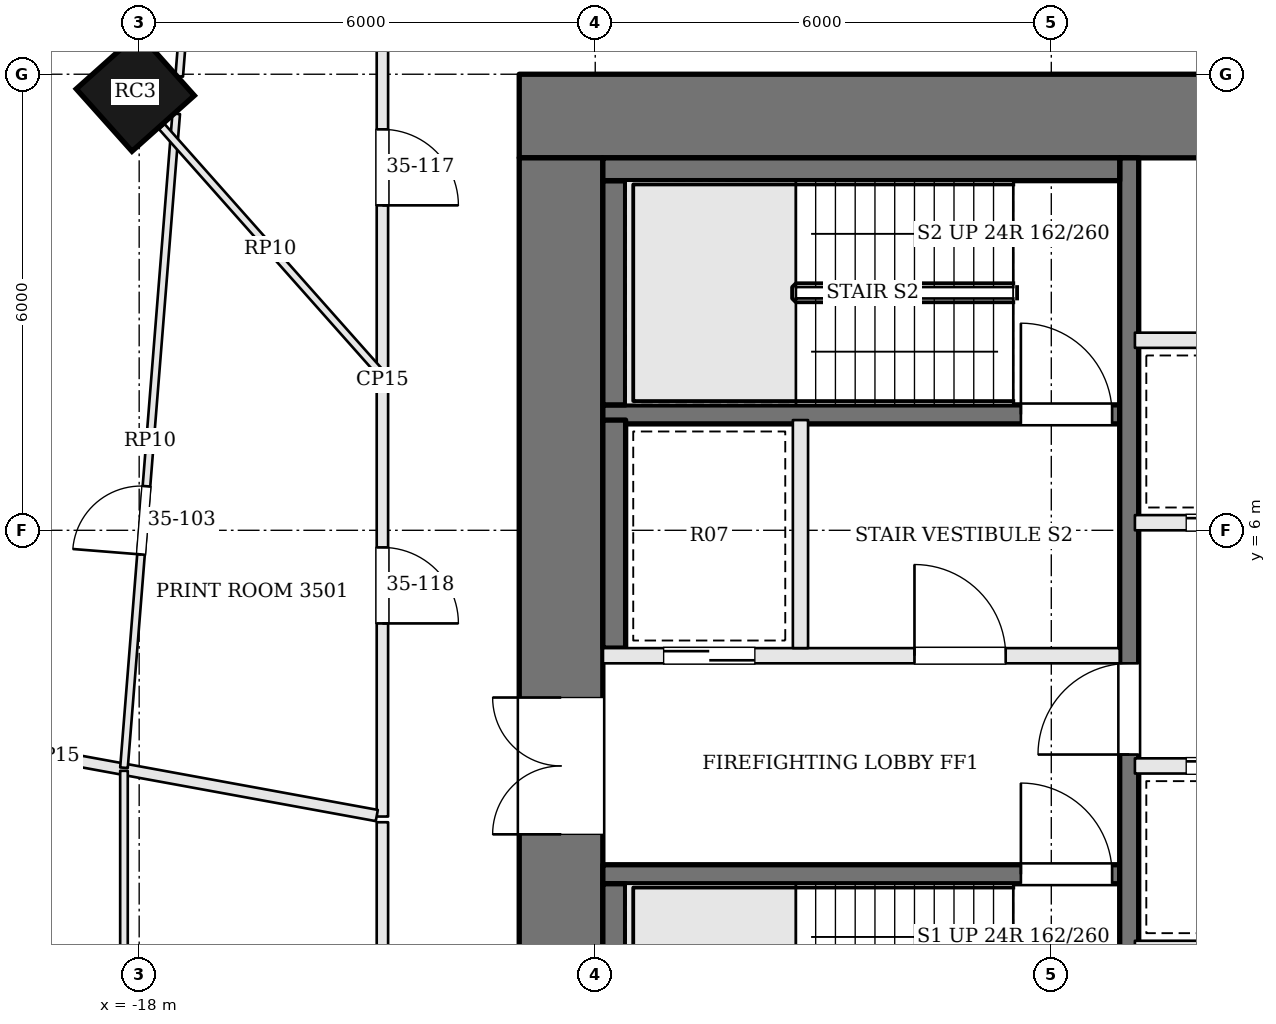
"""IFC4 building model, lengths in metres.
Left out: names, types, materials, properties, quantities, classifications, styles, units other than length and angle.
Written with IfcOpenShell. Run it as: python <this file> out.ifc"""

import sys

from ifc_helpers import new_model, si_unit, direction, frame, frame_2d, origin, origin_2d, place, context, subcontext, project, spatial, rectangle, extrude, element, fill, save


model = new_model("IFC4")
c1 = context("Model", 3, precision=1e-05, world=origin(), true_north=direction((0.0, 1.0)))
c2 = subcontext(c1, "Body", "Model", "MODEL_VIEW")
j1 = project(units=[si_unit("LENGTHUNIT", "METRE"), si_unit("PLANEANGLEUNIT", "RADIAN")], contexts=[c1])
p1 = place(None, origin())
s1 = spatial("IfcSite", under=j1, at=p1, CompositionType="ELEMENT")
p2 = place(p1, origin())
s2 = spatial("IfcBuilding", under=s1, at=p2, CompositionType="ELEMENT")
p3 = place(p2, frame((0.0, 0.0, 146.1)))
s3 = spatial("IfcBuildingStorey", under=s2, at=p3, CompositionType="ELEMENT", Elevation=146.1)
p4 = place(p3, frame((-13.0, 11.45, 0.0), z_axis=(0.0, 0.0, 1.0), x_axis=(1.0, 0.0, 0.0)))
e1 = element("IfcWall", 1, at=p4, inside=s3, PredefinedType="SHEAR", context=c2, shape_type="SweptSolid", body=[
    extrude(rectangle(XDim=26.0, YDim=1.1, at=frame_2d((13.0, 0.0))), origin(), (0.0, 0.0, 1.0), 3.9),
])
p5 = place(p4, frame((8.975, 0.0, 0.0)))
e2 = element("IfcOpeningElement", 2, at=p5, cuts=e1, PredefinedType="OPENING", context=c2, shape_type="SweptSolid", body=[
    extrude(rectangle(XDim=0.7, YDim=2.1, at=frame_2d((0.35, 1.05))), frame((0.0, 0.56, 0.0), z_axis=(0.0, -1.0, 0.0), x_axis=(1.0, 0.0, 0.0)), (0.0, 0.0, 1.0), 1.12),
])
p6 = place(p4, frame((11.025, 0.0, 0.0)))
e3 = element("IfcOpeningElement", 3, at=p6, cuts=e1, PredefinedType="OPENING", context=c2, shape_type="SweptSolid", body=[
    extrude(rectangle(XDim=0.7, YDim=2.1, at=frame_2d((0.35, 1.05))), frame((0.0, 0.56, 0.0), z_axis=(0.0, -1.0, 0.0), x_axis=(1.0, 0.0, 0.0)), (0.0, 0.0, 1.0), 1.12),
])
p7 = place(p4, frame((12.925, 0.0, 0.0)))
e4 = element("IfcOpeningElement", 4, at=p7, cuts=e1, PredefinedType="OPENING", context=c2, shape_type="SweptSolid", body=[
    extrude(rectangle(XDim=1.0, YDim=2.1, at=frame_2d((0.5, 1.05))), frame((0.0, 0.56, 0.0), z_axis=(0.0, -1.0, 0.0), x_axis=(1.0, 0.0, 0.0)), (0.0, 0.0, 1.0), 1.12),
])
p8 = place(p4, frame((15.775, 0.0, 0.0)))
e5 = element("IfcOpeningElement", 5, at=p8, cuts=e1, PredefinedType="OPENING", context=c2, shape_type="SweptSolid", body=[
    extrude(rectangle(XDim=1.0, YDim=2.1, at=frame_2d((0.5, 1.05))), frame((0.0, 0.56, 0.0), z_axis=(0.0, -1.0, 0.0), x_axis=(1.0, 0.0, 0.0)), (0.0, 0.0, 1.0), 1.12),
])
p9 = place(p3, frame((-12.45, -1.9, 0.0), z_axis=(0.0, 0.0, 1.0), x_axis=(0.0, 1.0, 0.0)))
e6 = element("IfcWall", 6, at=p9, inside=s3, PredefinedType="SHEAR", context=c2, shape_type="SweptSolid", body=[
    extrude(rectangle(XDim=12.8, YDim=1.1, at=frame_2d((6.4, 0.0))), origin(), (0.0, 0.0, 1.0), 3.9),
])
p10 = place(p9, frame((3.9, 0.0, 0.0)))
e7 = element("IfcOpeningElement", 7, at=p10, cuts=e6, PredefinedType="OPENING", context=c2, shape_type="SweptSolid", body=[
    extrude(rectangle(XDim=1.8, YDim=2.1, at=frame_2d((0.9, 1.05))), frame((0.0, 0.56, 0.0), z_axis=(0.0, -1.0, 0.0), x_axis=(1.0, 0.0, 0.0)), (0.0, 0.0, 1.0), 1.12),
])
p11 = place(p3, frame((-18.051, 11.763, 0.0), z_axis=(0.0, 0.0, 1.0), x_axis=(-0.7456420961, -0.66634665492, 0.0)))
e8 = element("IfcColumn", 8, at=p11, inside=s3, PredefinedType="COLUMN", context=c2, shape_type="SweptSolid", body=[
    extrude(rectangle(XDim=1.1, YDim=1.1, at=origin_2d()), origin(), (0.0, 0.0, 1.0), 3.9),
])
p12 = place(p3, frame((-11.9, 1.475, 0.0), z_axis=(0.0, 0.0, 1.0), x_axis=(1.0, 0.0, 0.0)))
e9 = element("IfcWall", 9, at=p12, inside=s3, PredefinedType="SOLIDWALL", context=c2, shape_type="SweptSolid", body=[
    extrude(rectangle(XDim=6.8, YDim=0.25, at=frame_2d((3.4, 0.0))), origin(), (0.0, 0.0, 1.0), 3.7),
])
p13 = place(p12, frame((5.5, 0.0, 0.0)))
e10 = element("IfcOpeningElement", 10, at=p13, cuts=e9, PredefinedType="OPENING", context=c2, shape_type="SweptSolid", body=[
    extrude(rectangle(XDim=1.2, YDim=2.1, at=frame_2d((0.6, 1.05))), frame((0.0, 0.135, 0.0), z_axis=(0.0, -1.0, 0.0), x_axis=(1.0, 0.0, 0.0)), (0.0, 0.0, 1.0), 0.27),
])
p14 = place(p3, frame((-11.9, 4.35, 0.0), z_axis=(0.0, 0.0, 1.0), x_axis=(1.0, 0.0, 0.0)))
e11 = element("IfcWall", 11, at=p14, inside=s3, PredefinedType="SOLIDWALL", context=c2, shape_type="SweptSolid", body=[
    extrude(rectangle(XDim=6.8, YDim=0.2, at=frame_2d((3.4, 0.0))), origin(), (0.0, 0.0, 1.0), 3.7),
])
p15 = place(p14, frame((4.1, 0.0, 0.0)))
e12 = element("IfcOpeningElement", 12, at=p15, cuts=e11, PredefinedType="OPENING", context=c2, shape_type="SweptSolid", body=[
    extrude(rectangle(XDim=1.2, YDim=2.1, at=frame_2d((0.6, 1.05))), frame((0.0, 0.11, 0.0), z_axis=(0.0, -1.0, 0.0), x_axis=(1.0, 0.0, 0.0)), (0.0, 0.0, 1.0), 0.22),
])
p16 = place(p14, frame((0.8, 0.0, 0.0)))
e13 = element("IfcOpeningElement", 13, at=p16, cuts=e11, PredefinedType="OPENING", context=c2, shape_type="SweptSolid", body=[
    extrude(rectangle(XDim=1.2, YDim=2.1, at=frame_2d((0.6, 1.05))), frame((0.0, 0.11, 0.0), z_axis=(0.0, -1.0, 0.0), x_axis=(1.0, 0.0, 0.0)), (0.0, 0.0, 1.0), 0.22),
])
p17 = place(p3, frame((-11.9, 7.525, 0.0), z_axis=(0.0, 0.0, 1.0), x_axis=(1.0, 0.0, 0.0)))
e14 = element("IfcWall", 14, at=p17, inside=s3, PredefinedType="SOLIDWALL", context=c2, shape_type="SweptSolid", body=[
    extrude(rectangle(XDim=6.8, YDim=0.25, at=frame_2d((3.4, 0.0))), origin(), (0.0, 0.0, 1.0), 3.7),
])
p18 = place(p17, frame((5.5, 0.0, 0.0)))
e15 = element("IfcOpeningElement", 15, at=p18, cuts=e14, PredefinedType="OPENING", context=c2, shape_type="SweptSolid", body=[
    extrude(rectangle(XDim=1.2, YDim=2.1, at=frame_2d((0.6, 1.05))), frame((0.0, 0.135, 0.0), z_axis=(0.0, -1.0, 0.0), x_axis=(1.0, 0.0, 0.0)), (0.0, 0.0, 1.0), 0.27),
])
p19 = place(p3, frame((-9.3, 4.45, 0.0), z_axis=(0.0, 0.0, 1.0), x_axis=(0.0, 1.0, 0.0)))
e16 = element("IfcWall", 16, at=p19, inside=s3, PredefinedType="SOLIDWALL", context=c2, shape_type="SweptSolid", body=[
    extrude(rectangle(XDim=3.0, YDim=0.2, at=frame_2d((1.5, 0.0))), origin(), (0.0, 0.0, 1.0), 3.7),
])
p20 = place(p3, frame((-4.975, -1.9, 0.0), z_axis=(0.0, 0.0, 1.0), x_axis=(0.0, 1.0, 0.0)))
e17 = element("IfcWall", 17, at=p20, inside=s3, PredefinedType="SOLIDWALL", context=c2, shape_type="SweptSolid", body=[
    extrude(rectangle(XDim=12.8, YDim=0.25, at=frame_2d((6.4, 0.0))), origin(), (0.0, 0.0, 1.0), 3.7),
])
p21 = place(p20, frame((4.95, 0.0, 0.0)))
e18 = element("IfcOpeningElement", 18, at=p21, cuts=e17, PredefinedType="OPENING", context=c2, shape_type="SweptSolid", body=[
    extrude(rectangle(XDim=1.2, YDim=2.1, at=frame_2d((0.6, 1.05))), frame((0.0, 0.135, 0.0), z_axis=(0.0, -1.0, 0.0), x_axis=(1.0, 0.0, 0.0)), (0.0, 0.0, 1.0), 0.27),
])
p22 = place(p3, frame((-11.75, -1.6, 0.0), z_axis=(0.0, 0.0, 1.0), x_axis=(0.0, 1.0, 0.0)))
e19 = element("IfcWall", 19, at=p22, inside=s3, PredefinedType="SOLIDWALL", context=c2, shape_type="SweptSolid", body=[
    extrude(rectangle(XDim=2.95, YDim=0.3, at=frame_2d((1.475, 0.0))), origin(), (0.0, 0.0, 1.0), 3.7),
])
p23 = place(p3, frame((-11.75, 4.45, 0.0), z_axis=(0.0, 0.0, 1.0), x_axis=(0.0, 1.0, 0.0)))
e20 = element("IfcWall", 20, at=p23, inside=s3, PredefinedType="SOLIDWALL", context=c2, shape_type="SweptSolid", body=[
    extrude(rectangle(XDim=3.0, YDim=0.3, at=frame_2d((1.5, 0.0))), origin(), (0.0, 0.0, 1.0), 3.7),
])
p24 = place(p3, frame((-11.75, 7.65, 0.0), z_axis=(0.0, 0.0, 1.0), x_axis=(0.0, 1.0, 0.0)))
e21 = element("IfcWall", 21, at=p24, inside=s3, PredefinedType="SOLIDWALL", context=c2, shape_type="SweptSolid", body=[
    extrude(rectangle(XDim=2.95, YDim=0.3, at=frame_2d((1.475, 0.0))), origin(), (0.0, 0.0, 1.0), 3.7),
])
p25 = place(p3, frame((-11.9, 10.75, 0.0), z_axis=(0.0, 0.0, 1.0), x_axis=(1.0, 0.0, 0.0)))
e22 = element("IfcWall", 22, at=p25, inside=s3, PredefinedType="SOLIDWALL", context=c2, shape_type="SweptSolid", body=[
    extrude(rectangle(XDim=6.8, YDim=0.3, at=frame_2d((3.4, 0.0))), origin(), (0.0, 0.0, 1.0), 3.7),
])
p26 = place(p3, frame((-4.9, 0.5, 0.0), z_axis=(0.0, 0.0, 1.0), x_axis=(1.0, 0.0, 0.0)))
e23 = element("IfcWall", 23, at=p26, inside=s3, PredefinedType="SOLIDWALL", context=c2, shape_type="SweptSolid", body=[
    extrude(rectangle(XDim=9.8, YDim=0.2, at=frame_2d((4.9, 0.0))), origin(), (0.0, 0.0, 1.0), 3.7),
])
p27 = place(p3, frame((-4.9, 2.9, 0.0), z_axis=(0.0, 0.0, 1.0), x_axis=(1.0, 0.0, 0.0)))
e24 = element("IfcWall", 24, at=p27, inside=s3, PredefinedType="SOLIDWALL", context=c2, shape_type="SweptSolid", body=[
    extrude(rectangle(XDim=9.8, YDim=0.2, at=frame_2d((4.9, 0.0))), origin(), (0.0, 0.0, 1.0), 3.7),
])
p28 = place(p27, frame((0.675, 0.0, 0.0)))
e25 = element("IfcOpeningElement", 25, at=p28, cuts=e24, PredefinedType="OPENING", context=c2, shape_type="SweptSolid", body=[
    extrude(rectangle(XDim=1.1, YDim=2.1, at=frame_2d((0.55, 1.05))), frame((0.0, 0.11, 0.0), z_axis=(0.0, -1.0, 0.0), x_axis=(1.0, 0.0, 0.0)), (0.0, 0.0, 1.0), 0.22),
])
p29 = place(p27, frame((2.613, 0.0, 0.0)))
e26 = element("IfcOpeningElement", 26, at=p29, cuts=e24, PredefinedType="OPENING", context=c2, shape_type="SweptSolid", body=[
    extrude(rectangle(XDim=0.9, YDim=2.1, at=frame_2d((0.45, 1.05))), frame((0.0, 0.11, 0.0), z_axis=(0.0, -1.0, 0.0), x_axis=(1.0, 0.0, 0.0)), (0.0, 0.0, 1.0), 0.22),
])
p30 = place(p27, frame((4.35, 0.0, 0.0)))
e27 = element("IfcOpeningElement", 27, at=p30, cuts=e24, PredefinedType="OPENING", context=c2, shape_type="SweptSolid", body=[
    extrude(rectangle(XDim=1.1, YDim=2.1, at=frame_2d((0.55, 1.05))), frame((0.0, 0.11, 0.0), z_axis=(0.0, -1.0, 0.0), x_axis=(1.0, 0.0, 0.0)), (0.0, 0.0, 1.0), 0.22),
])
p31 = place(p27, frame((7.463, 0.0, 0.0)))
e28 = element("IfcOpeningElement", 28, at=p31, cuts=e24, PredefinedType="OPENING", context=c2, shape_type="SweptSolid", body=[
    extrude(rectangle(XDim=1.0, YDim=2.1, at=frame_2d((0.5, 1.05))), frame((0.0, 0.11, 0.0), z_axis=(0.0, -1.0, 0.0), x_axis=(1.0, 0.0, 0.0)), (0.0, 0.0, 1.0), 0.22),
])
p32 = place(p3, frame((-4.9, 6.1, 0.0), z_axis=(0.0, 0.0, 1.0), x_axis=(1.0, 0.0, 0.0)))
e29 = element("IfcWall", 29, at=p32, inside=s3, PredefinedType="SOLIDWALL", context=c2, shape_type="SweptSolid", body=[
    extrude(rectangle(XDim=9.8, YDim=0.2, at=frame_2d((4.9, 0.0))), origin(), (0.0, 0.0, 1.0), 3.7),
])
p33 = place(p32, frame((0.675, 0.0, 0.0)))
e30 = element("IfcOpeningElement", 30, at=p33, cuts=e29, PredefinedType="OPENING", context=c2, shape_type="SweptSolid", body=[
    extrude(rectangle(XDim=1.1, YDim=2.1, at=frame_2d((0.55, 1.05))), frame((0.0, 0.11, 0.0), z_axis=(0.0, -1.0, 0.0), x_axis=(1.0, 0.0, 0.0)), (0.0, 0.0, 1.0), 0.22),
])
p34 = place(p32, frame((3.125, 0.0, 0.0)))
e31 = element("IfcOpeningElement", 31, at=p34, cuts=e29, PredefinedType="OPENING", context=c2, shape_type="SweptSolid", body=[
    extrude(rectangle(XDim=1.1, YDim=2.1, at=frame_2d((0.55, 1.05))), frame((0.0, 0.11, 0.0), z_axis=(0.0, -1.0, 0.0), x_axis=(1.0, 0.0, 0.0)), (0.0, 0.0, 1.0), 0.22),
])
p35 = place(p32, frame((5.575, 0.0, 0.0)))
e32 = element("IfcOpeningElement", 32, at=p35, cuts=e29, PredefinedType="OPENING", context=c2, shape_type="SweptSolid", body=[
    extrude(rectangle(XDim=1.1, YDim=2.1, at=frame_2d((0.55, 1.05))), frame((0.0, 0.11, 0.0), z_axis=(0.0, -1.0, 0.0), x_axis=(1.0, 0.0, 0.0)), (0.0, 0.0, 1.0), 0.22),
])
p36 = place(p32, frame((8.025, 0.0, 0.0)))
e33 = element("IfcOpeningElement", 33, at=p36, cuts=e29, PredefinedType="OPENING", context=c2, shape_type="SweptSolid", body=[
    extrude(rectangle(XDim=1.1, YDim=2.1, at=frame_2d((0.55, 1.05))), frame((0.0, 0.11, 0.0), z_axis=(0.0, -1.0, 0.0), x_axis=(1.0, 0.0, 0.0)), (0.0, 0.0, 1.0), 0.22),
])
p37 = place(p3, frame((-4.9, 8.5, 0.0), z_axis=(0.0, 0.0, 1.0), x_axis=(1.0, 0.0, 0.0)))
e34 = element("IfcWall", 34, at=p37, inside=s3, PredefinedType="SOLIDWALL", context=c2, shape_type="SweptSolid", body=[
    extrude(rectangle(XDim=9.8, YDim=0.2, at=frame_2d((4.9, 0.0))), origin(), (0.0, 0.0, 1.0), 3.7),
])
p38 = place(p3, frame((-14.8, 13.725, 0.0), z_axis=(0.0, 0.0, 1.0), x_axis=(0.0, -1.0, 0.0)))
e35 = element("IfcWall", 35, at=p38, inside=s3, PredefinedType="PARTITIONING", context=c2, shape_type="SweptSolid", body=[
    extrude(rectangle(XDim=11.491, YDim=0.15, at=frame_2d((5.745, 0.0))), origin(), (0.0, 0.0, 1.0), 3.198),
])
p39 = place(p38, frame((2.45, 0.0, 0.0)))
e36 = element("IfcOpeningElement", 36, at=p39, cuts=e35, PredefinedType="OPENING", context=c2, shape_type="SweptSolid", body=[
    extrude(rectangle(XDim=1.0, YDim=2.1, at=frame_2d((0.5, 1.05))), frame((0.0, 0.085, 0.0), z_axis=(0.0, -1.0, 0.0), x_axis=(1.0, 0.0, 0.0)), (0.0, 0.0, 1.0), 0.17),
])
p40 = place(p38, frame((7.95, 0.0, 0.0)))
e37 = element("IfcOpeningElement", 37, at=p40, cuts=e35, PredefinedType="OPENING", context=c2, shape_type="SweptSolid", body=[
    extrude(rectangle(XDim=1.0, YDim=2.1, at=frame_2d((0.5, 1.05))), frame((0.0, 0.085, 0.0), z_axis=(0.0, -1.0, 0.0), x_axis=(1.0, 0.0, 0.0)), (0.0, 0.0, 1.0), 0.17),
])
p41 = place(p3, frame((-23.373, 3.802, 0.0), z_axis=(0.0, 0.0, 1.0), x_axis=(0.983692652106, -0.179857627561, 0.0)))
e38 = element("IfcWall", 38, at=p41, inside=s3, PredefinedType="PARTITIONING", context=c2, shape_type="SweptSolid", body=[
    extrude(rectangle(XDim=8.64, YDim=0.15, at=frame_2d((4.32, 0.0))), origin(), (0.0, 0.0, 1.0), 3.234),
])
p42 = place(p3, frame((-14.8, 2.159, 0.0), z_axis=(0.0, 0.0, 1.0), x_axis=(0.0, -1.0, 0.0)))
e39 = element("IfcWall", 39, at=p42, inside=s3, PredefinedType="PARTITIONING", context=c2, shape_type="SweptSolid", body=[
    extrude(rectangle(XDim=6.959, YDim=0.15, at=frame_2d((3.479, 0.0))), origin(), (0.0, 0.0, 1.0), 3.198),
])
p43 = place(p42, frame((2.03, 0.0, 0.0)))
e40 = element("IfcOpeningElement", 40, at=p43, cuts=e39, PredefinedType="OPENING", context=c2, shape_type="SweptSolid", body=[
    extrude(rectangle(XDim=1.8, YDim=2.1, at=frame_2d((0.9, 1.05))), frame((0.0, 0.085, 0.0), z_axis=(0.0, -1.0, 0.0), x_axis=(1.0, 0.0, 0.0)), (0.0, 0.0, 1.0), 0.17),
])
p44 = place(p3, frame((-18.2, 2.876, 0.0), z_axis=(0.0, 0.0, 1.0), x_axis=(0.079629418232, 0.99682453609, 0.0)))
e41 = element("IfcWall", 41, at=p44, inside=s3, PredefinedType="PARTITIONING", context=c2, shape_type="SweptSolid", body=[
    extrude(rectangle(XDim=8.631, YDim=0.1, at=frame_2d((4.315, 0.0))), origin(), (0.0, 0.0, 1.0), 3.184),
])
p45 = place(p44, frame((2.815, 0.0, 0.0)))
e42 = element("IfcOpeningElement", 42, at=p45, cuts=e41, PredefinedType="OPENING", context=c2, shape_type="SweptSolid", body=[
    extrude(rectangle(XDim=0.9, YDim=2.1, at=frame_2d((0.45, 1.05))), frame((0.0, 0.06, 0.0), z_axis=(0.0, -1.0, 0.0), x_axis=(1.0, 0.0, 0.0)), (0.0, 0.0, 1.0), 0.12),
])
p46 = place(p3, frame((-17.473, 11.972, 0.0), z_axis=(0.0, 0.0, 1.0), x_axis=(0.079641059306, 0.996823606097, 0.0)))
e43 = element("IfcWall", 43, at=p46, inside=s3, PredefinedType="PARTITIONING", context=c2, shape_type="SweptSolid", body=[
    extrude(rectangle(XDim=3.354, YDim=0.1, at=frame_2d((1.677, 0.0))), origin(), (0.0, 0.0, 1.0), 3.184),
])
p47 = place(p3, frame((-14.85, 8.099, 0.0), z_axis=(0.0, 0.0, 1.0), x_axis=(-0.664003906353, 0.747729103585, 0.0)))
e44 = element("IfcWall", 44, at=p47, inside=s3, PredefinedType="PARTITIONING", context=c2, shape_type="SweptSolid", body=[
    extrude(rectangle(XDim=4.295, YDim=0.1, at=frame_2d((2.147, 0.0))), origin(), (0.0, 0.0, 1.0), 3.184),
])
p48 = place(p3, frame((-18.2, -8.15, 0.0), z_axis=(0.0, 0.0, 1.0), x_axis=(0.0, 1.0, 0.0)))
e45 = element("IfcWall", 45, at=p48, inside=s3, PredefinedType="PARTITIONING", context=c2, shape_type="SweptSolid", body=[
    extrude(rectangle(XDim=10.986, YDim=0.1, at=frame_2d((5.493, 0.0))), origin(), (0.0, 0.0, 1.0), 3.184),
])
p49 = place(p48, frame((6.864, 0.0, 0.0)))
e46 = element("IfcOpeningElement", 46, at=p49, cuts=e45, PredefinedType="OPENING", context=c2, shape_type="SweptSolid", body=[
    extrude(rectangle(XDim=1.0, YDim=2.1, at=frame_2d((0.5, 1.05))), frame((0.0, 0.06, 0.0), z_axis=(0.0, -1.0, 0.0), x_axis=(1.0, 0.0, 0.0)), (0.0, 0.0, 1.0), 0.12),
])
p50 = place(p10, origin())
e47 = element("IfcDoor", 47, at=p50, inside=s3, OperationType="DOUBLE_DOOR_SINGLE_SWING", PredefinedType="DOOR", context=c2, shape_type="SweptSolid", body=[
    extrude(rectangle(XDim=1.8, YDim=2.1, at=frame_2d((0.9, 1.05))), frame((0.0, 0.025, 0.0), z_axis=(0.0, -1.0, 0.0), x_axis=(1.0, 0.0, 0.0)), (0.0, 0.0, 1.0), 0.05),
])
fill(e7, e47)
p51 = place(p21, origin())
e48 = element("IfcDoor", 48, at=p51, inside=s3, OperationType="SINGLE_SWING_LEFT", PredefinedType="DOOR", context=c2, shape_type="SweptSolid", body=[
    extrude(rectangle(XDim=1.2, YDim=2.1, at=frame_2d((0.6, 1.05))), frame((0.0, 0.025, 0.0), z_axis=(0.0, -1.0, 0.0), x_axis=(1.0, 0.0, 0.0)), (0.0, 0.0, 1.0), 0.05),
])
fill(e18, e48)
p52 = place(p15, origin())
e49 = element("IfcDoor", 49, at=p52, inside=s3, OperationType="SINGLE_SWING_LEFT", PredefinedType="DOOR", context=c2, shape_type="SweptSolid", body=[
    extrude(rectangle(XDim=1.2, YDim=2.1, at=frame_2d((0.6, 1.05))), frame((0.0, 0.025, 0.0), z_axis=(0.0, -1.0, 0.0), x_axis=(1.0, 0.0, 0.0)), (0.0, 0.0, 1.0), 0.05),
])
fill(e12, e49)
p53 = place(p13, origin())
e50 = element("IfcDoor", 50, at=p53, inside=s3, OperationType="SINGLE_SWING_LEFT", PredefinedType="DOOR", context=c2, shape_type="SweptSolid", body=[
    extrude(rectangle(XDim=1.2, YDim=2.1, at=frame_2d((0.6, 1.05))), frame((0.0, 0.025, 0.0), z_axis=(0.0, -1.0, 0.0), x_axis=(1.0, 0.0, 0.0)), (0.0, 0.0, 1.0), 0.05),
])
fill(e10, e50)
p54 = place(p18, origin())
e51 = element("IfcDoor", 51, at=p54, inside=s3, OperationType="SINGLE_SWING_LEFT", PredefinedType="DOOR", context=c2, shape_type="SweptSolid", body=[
    extrude(rectangle(XDim=1.2, YDim=2.1, at=frame_2d((0.6, 1.05))), frame((0.0, 0.025, 0.0), z_axis=(0.0, -1.0, 0.0), x_axis=(1.0, 0.0, 0.0)), (0.0, 0.0, 1.0), 0.05),
])
fill(e15, e51)
p55 = place(p16, origin())
e52 = element("IfcDoor", 52, at=p55, inside=s3, OperationType="SLIDING_TO_RIGHT", PredefinedType="DOOR", context=c2, shape_type="SweptSolid", body=[
    extrude(rectangle(XDim=1.2, YDim=2.1, at=frame_2d((0.6, 1.05))), frame((0.0, 0.025, 0.0), z_axis=(0.0, -1.0, 0.0), x_axis=(1.0, 0.0, 0.0)), (0.0, 0.0, 1.0), 0.05),
])
fill(e13, e52)
p56 = place(p28, origin())
e53 = element("IfcDoor", 53, at=p56, inside=s3, OperationType="SLIDING_TO_RIGHT", PredefinedType="DOOR", context=c2, shape_type="SweptSolid", body=[
    extrude(rectangle(XDim=1.1, YDim=2.1, at=frame_2d((0.55, 1.05))), frame((0.0, 0.025, 0.0), z_axis=(0.0, -1.0, 0.0), x_axis=(1.0, 0.0, 0.0)), (0.0, 0.0, 1.0), 0.05),
])
fill(e25, e53)
p57 = place(p33, origin())
e54 = element("IfcDoor", 54, at=p57, inside=s3, OperationType="SLIDING_TO_RIGHT", PredefinedType="DOOR", context=c2, shape_type="SweptSolid", body=[
    extrude(rectangle(XDim=1.1, YDim=2.1, at=frame_2d((0.55, 1.05))), frame((0.0, 0.025, 0.0), z_axis=(0.0, -1.0, 0.0), x_axis=(1.0, 0.0, 0.0)), (0.0, 0.0, 1.0), 0.05),
])
fill(e30, e54)
p58 = place(p45, origin())
e55 = element("IfcDoor", 55, at=p58, inside=s3, OperationType="SINGLE_SWING_LEFT", PredefinedType="DOOR", context=c2, shape_type="SweptSolid", body=[
    extrude(rectangle(XDim=0.9, YDim=2.1, at=frame_2d((0.45, 1.05))), frame((0.0, 0.025, 0.0), z_axis=(0.0, -1.0, 0.0), x_axis=(1.0, 0.0, 0.0)), (0.0, 0.0, 1.0), 0.05),
])
fill(e42, e55)
p59 = place(p39, origin())
e56 = element("IfcDoor", 56, at=p59, inside=s3, OperationType="SINGLE_SWING_RIGHT", PredefinedType="DOOR", context=c2, shape_type="SweptSolid", body=[
    extrude(rectangle(XDim=1.0, YDim=2.1, at=frame_2d((0.5, 1.05))), frame((0.0, 0.025, 0.0), z_axis=(0.0, -1.0, 0.0), x_axis=(1.0, 0.0, 0.0)), (0.0, 0.0, 1.0), 0.05),
])
fill(e36, e56)
p60 = place(p40, origin())
e57 = element("IfcDoor", 57, at=p60, inside=s3, OperationType="SINGLE_SWING_RIGHT", PredefinedType="DOOR", context=c2, shape_type="SweptSolid", body=[
    extrude(rectangle(XDim=1.0, YDim=2.1, at=frame_2d((0.5, 1.05))), frame((0.0, 0.025, 0.0), z_axis=(0.0, -1.0, 0.0), x_axis=(1.0, 0.0, 0.0)), (0.0, 0.0, 1.0), 0.05),
])
fill(e37, e57)
save(model, sys.argv[1])
